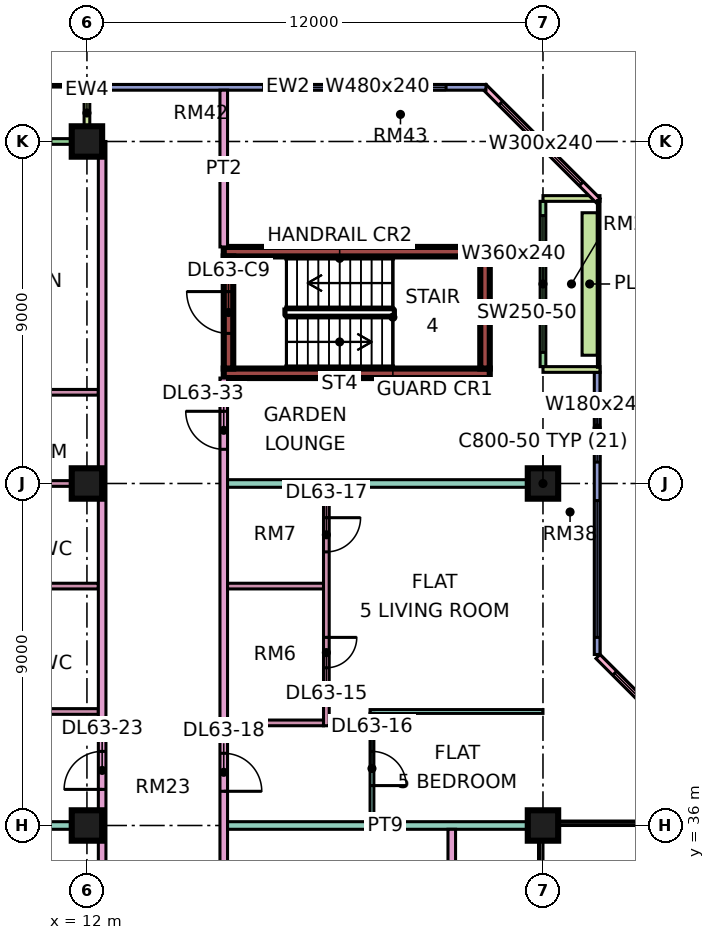
"""IFC4 building model, lengths in metres.
Left out: names, types, materials, properties, quantities, classifications, styles, units other than length and angle.
Written with IfcOpenShell. Run it as: python <this file> out.ifc"""

import sys

from ifc_helpers import new_model, si_unit, direction, frame, frame_2d, origin, origin_2d, place, context, subcontext, project, spatial, rectangle, extrude, element, fill, save


model = new_model("IFC4")
c1 = context("Model", 3, precision=1e-05, world=origin(), true_north=direction((0.0, 1.0)))
c2 = subcontext(c1, "Body", "Model", "MODEL_VIEW")
j1 = project(units=[si_unit("LENGTHUNIT", "METRE"), si_unit("PLANEANGLEUNIT", "RADIAN")], contexts=[c1])
p1 = place(None, origin())
s1 = spatial("IfcSite", under=j1, at=p1, CompositionType="ELEMENT")
p2 = place(p1, origin())
s2 = spatial("IfcBuilding", under=s1, at=p2, CompositionType="ELEMENT")
p3 = place(p2, frame((0.0, 0.0, 273.4)))
s3 = spatial("IfcBuildingStorey", under=s2, at=p3, CompositionType="ELEMENT", Elevation=273.4)
for number, where, z_axis, x_axis in (
    (1, (12.0, 36.0, 0.0), (0.0, 0.0, 1.0), (1.0, 0.0, 0.0)),
    (2, (12.0, 45.0, 0.0), (0.0, 0.0, 1.0), (1.0, 0.0, 0.0)),
    (3, (12.0, 54.0, 0.0), (0.0, 0.0, 1.0), (1.0, 0.0, 0.0)),
    (4, (24.0, 36.0, 0.0), (0.0, 0.0, 1.0), (1.0, 0.0, 0.0)),
    (5, (24.0, 45.0, 0.0), (0.0, 0.0, 1.0), (1.0, 0.0, 0.0)),
):
    element("IfcColumn", number, at=place(p3, frame(where, z_axis=z_axis, x_axis=x_axis)), inside=s3, PredefinedType="COLUMN", context=c2, shape_type="SweptSolid", body=[
        extrude(rectangle(XDim=0.8, YDim=0.8, at=origin_2d()), origin(), (0.0, 0.0, 1.0), 3.75),
    ])
for number, where, z_axis, x_axis in (
    (6, (15.6, 47.9, 0.0), (0.0, 0.0, 1.0), (1.0, 0.0, 0.0)),
    (7, (15.6, 51.1, 0.0), (0.0, 0.0, 1.0), (1.0, 0.0, 0.0)),
):
    element("IfcWall", number, at=place(p3, frame(where, z_axis=z_axis, x_axis=x_axis)), inside=s3, PredefinedType="SHEAR", context=c2, shape_type="SweptSolid", body=[
        extrude(rectangle(XDim=7.0, YDim=0.25, at=frame_2d((3.5, 0.0))), origin(), (0.0, 0.0, 1.0), 3.75),
    ])
p4 = place(p3, frame((15.725, 48.025, 0.0), z_axis=(0.0, 0.0, 1.0), x_axis=(0.0, 1.0, 0.0)))
e8 = element("IfcWall", 8, at=p4, inside=s3, PredefinedType="SHEAR", context=c2, shape_type="SweptSolid", body=[
    extrude(rectangle(XDim=2.95, YDim=0.25, at=frame_2d((1.475, 0.0))), origin(), (0.0, 0.0, 1.0), 3.75),
])
p5 = place(p4, frame((0.925, 0.0, 0.0)))
e9 = element("IfcOpeningElement", 9, at=p5, cuts=e8, PredefinedType="OPENING", context=c2, shape_type="SweptSolid", body=[
    extrude(rectangle(XDim=1.1, YDim=2.2, at=frame_2d((0.55, 1.1))), frame((0.0, 0.135, 0.0), z_axis=(0.0, -1.0, 0.0), x_axis=(1.0, 0.0, 0.0)), (0.0, 0.0, 1.0), 0.27),
])
p6 = place(p3, frame((22.475, 48.025, 0.0), z_axis=(0.0, 0.0, 1.0), x_axis=(0.0, 1.0, 0.0)))
e10 = element("IfcWall", 10, at=p6, inside=s3, PredefinedType="SHEAR", context=c2, shape_type="SweptSolid", body=[
    extrude(rectangle(XDim=2.95, YDim=0.25, at=frame_2d((1.475, 0.0))), origin(), (0.0, 0.0, 1.0), 3.75),
])
p7 = place(p3, frame((28.447, 37.447, 0.0), z_axis=(0.0, 0.0, 1.0), x_axis=(-0.707106781187, 0.707106781187, 0.0)))
e11 = element("IfcWall", 11, at=p7, inside=s3, PredefinedType="SOLIDWALL", context=c2, shape_type="SweptSolid", body=[
    extrude(rectangle(XDim=4.243, YDim=0.15, at=frame_2d((2.121, 0.0))), origin(), (0.0, 0.0, 1.0), 3.35),
])
p8 = place(p7, frame((0.621, 0.0, 0.45)))
e12 = element("IfcOpeningElement", 12, at=p8, cuts=e11, PredefinedType="OPENING", context=c2, shape_type="SweptSolid", body=[
    extrude(rectangle(XDim=3.0, YDim=2.4, at=frame_2d((1.5, 1.2))), frame((0.0, 0.085, 0.0), z_axis=(0.0, -1.0, 0.0), x_axis=(1.0, 0.0, 0.0)), (0.0, 0.0, 1.0), 0.17),
])
p9 = place(p3, frame((25.425, 40.5, 0.0), z_axis=(0.0, 0.0, 1.0), x_axis=(0.0, 1.0, 0.0)))
e13 = element("IfcWall", 13, at=p9, inside=s3, PredefinedType="SOLIDWALL", context=c2, shape_type="SweptSolid", body=[
    extrude(rectangle(XDim=7.425, YDim=0.15, at=frame_2d((3.712, 0.0))), origin(), (0.0, 0.0, 1.0), 3.35),
])
p10 = place(p9, frame((0.45, 0.0, 0.45)))
e14 = element("IfcOpeningElement", 14, at=p10, cuts=e13, PredefinedType="OPENING", context=c2, shape_type="SweptSolid", body=[
    extrude(rectangle(XDim=3.6, YDim=2.4, at=frame_2d((1.8, 1.2))), frame((0.0, 0.085, 0.0), z_axis=(0.0, -1.0, 0.0), x_axis=(1.0, 0.0, 0.0)), (0.0, 0.0, 1.0), 0.17),
])
p11 = place(p9, frame((5.062, 0.0, 0.45)))
e15 = element("IfcOpeningElement", 15, at=p11, cuts=e13, PredefinedType="OPENING", context=c2, shape_type="SweptSolid", body=[
    extrude(rectangle(XDim=1.8, YDim=2.4, at=frame_2d((0.9, 1.2))), frame((0.0, 0.085, 0.0), z_axis=(0.0, -1.0, 0.0), x_axis=(1.0, 0.0, 0.0)), (0.0, 0.0, 1.0), 0.17),
])
p12 = place(p3, frame((24.0, 48.075, 0.0), z_axis=(0.0, 0.0, 1.0), x_axis=(0.0, 1.0, 0.0)))
e16 = element("IfcWall", 16, at=p12, inside=s3, PredefinedType="SOLIDWALL", context=c2, shape_type="SweptSolid", body=[
    extrude(rectangle(XDim=4.35, YDim=0.15, at=frame_2d((2.175, 0.0))), origin(), (0.0, 0.0, 1.0), 3.35),
])
p13 = place(p12, frame((0.375, 0.0, 0.45)))
e17 = element("IfcOpeningElement", 17, at=p13, cuts=e16, PredefinedType="OPENING", context=c2, shape_type="SweptSolid", body=[
    extrude(rectangle(XDim=3.6, YDim=2.4, at=frame_2d((1.8, 1.2))), frame((0.0, 0.085, 0.0), z_axis=(0.0, -1.0, 0.0), x_axis=(1.0, 0.0, 0.0)), (0.0, 0.0, 1.0), 0.17),
])
for number, where, z_axis, x_axis in (
    (18, (25.5, 48.0, 0.0), (0.0, 0.0, 1.0), (-1.0, 0.0, 0.0)),
    (19, (25.5, 52.5, 0.0), (0.0, 0.0, 1.0), (-1.0, 0.0, 0.0)),
):
    element("IfcWall", number, at=place(p3, frame(where, z_axis=z_axis, x_axis=x_axis)), inside=s3, PredefinedType="SOLIDWALL", context=c2, shape_type="SweptSolid", body=[
        extrude(rectangle(XDim=1.5, YDim=0.15, at=frame_2d((0.75, 0.0))), origin(), (0.0, 0.0, 1.0), 3.35),
    ])
p14 = place(p3, frame((25.447, 52.447, 0.0), z_axis=(0.0, 0.0, 1.0), x_axis=(-0.707106781187, 0.707106781187, 0.0)))
e20 = element("IfcWall", 20, at=p14, inside=s3, PredefinedType="SOLIDWALL", context=c2, shape_type="SweptSolid", body=[
    extrude(rectangle(XDim=4.243, YDim=0.15, at=frame_2d((2.121, 0.0))), origin(), (0.0, 0.0, 1.0), 3.35),
])
p15 = place(p14, frame((0.621, 0.0, 0.45)))
e21 = element("IfcOpeningElement", 21, at=p15, cuts=e20, PredefinedType="OPENING", context=c2, shape_type="SweptSolid", body=[
    extrude(rectangle(XDim=3.0, YDim=2.4, at=frame_2d((1.5, 1.2))), frame((0.0, 0.085, 0.0), z_axis=(0.0, -1.0, 0.0), x_axis=(1.0, 0.0, 0.0)), (0.0, 0.0, 1.0), 0.17),
])
p16 = place(p3, frame((22.5, 55.425, 0.0), z_axis=(0.0, 0.0, 1.0), x_axis=(-1.0, 0.0, 0.0)))
e22 = element("IfcWall", 22, at=p16, inside=s3, PredefinedType="SOLIDWALL", context=c2, shape_type="SweptSolid", body=[
    extrude(rectangle(XDim=10.425, YDim=0.15, at=frame_2d((5.212, 0.0))), origin(), (0.0, 0.0, 1.0), 3.35),
])
p17 = place(p16, frame((1.05, 0.0, 0.45)))
e23 = element("IfcOpeningElement", 23, at=p17, cuts=e22, PredefinedType="OPENING", context=c2, shape_type="SweptSolid", body=[
    extrude(rectangle(XDim=4.8, YDim=2.4, at=frame_2d((2.4, 1.2))), frame((0.0, 0.085, 0.0), z_axis=(0.0, -1.0, 0.0), x_axis=(1.0, 0.0, 0.0)), (0.0, 0.0, 1.0), 0.17),
])
p18 = place(p3, frame((11.925, 54.0, 0.0), z_axis=(0.0, 0.0, 1.0), x_axis=(-1.0, 0.0, 0.0)))
e24 = element("IfcWall", 24, at=p18, inside=s3, PredefinedType="SOLIDWALL", context=c2, shape_type="SweptSolid", body=[
    extrude(rectangle(XDim=10.35, YDim=0.15, at=frame_2d((5.175, 0.0))), origin(), (0.0, 0.0, 1.0), 3.35),
])
p19 = place(p18, frame((0.875, 0.0, 0.45)))
e25 = element("IfcOpeningElement", 25, at=p19, cuts=e24, PredefinedType="OPENING", context=c2, shape_type="SweptSolid", body=[
    extrude(rectangle(XDim=3.0, YDim=2.4, at=frame_2d((1.5, 1.2))), frame((0.0, 0.085, 0.0), z_axis=(0.0, -1.0, 0.0), x_axis=(1.0, 0.0, 0.0)), (0.0, 0.0, 1.0), 0.17),
])
p20 = place(p18, frame((7.038, 0.0, 0.0)))
e26 = element("IfcOpeningElement", 26, at=p20, cuts=e24, PredefinedType="OPENING", context=c2, shape_type="SweptSolid", body=[
    extrude(rectangle(XDim=1.8, YDim=2.4, at=frame_2d((0.9, 1.2))), frame((0.0, 0.085, 0.0), z_axis=(0.0, -1.0, 0.0), x_axis=(1.0, 0.0, 0.0)), (0.0, 0.0, 1.0), 0.17),
])
p21 = place(p3, frame((12.0, 55.5, 0.0), z_axis=(0.0, 0.0, 1.0), x_axis=(0.0, -1.0, 0.0)))
e27 = element("IfcWall", 27, at=p21, inside=s3, PredefinedType="SOLIDWALL", context=c2, shape_type="SweptSolid", body=[
    extrude(rectangle(XDim=1.5, YDim=0.15, at=frame_2d((0.75, 0.0))), origin(), (0.0, 0.0, 1.0), 3.35),
])
p22 = place(p3, frame((25.229, 48.375, 0.0), z_axis=(0.0, 0.0, 1.0), x_axis=(0.0, 1.0, 0.0)))
e28 = element("IfcWall", 28, at=p22, inside=s3, PredefinedType="SOLIDWALL", context=c2, shape_type="SweptSolid", body=[
    extrude(rectangle(XDim=3.75, YDim=0.4, at=frame_2d((1.875, 0.0))), origin(), (0.0, 0.0, 1.0), 0.7),
])
p23 = place(p3, frame((0.0, 36.0, 0.0), z_axis=(0.0, 0.0, 1.0), x_axis=(1.0, 0.0, 0.0)))
e29 = element("IfcWall", 29, at=p23, inside=s3, PredefinedType="PARTITIONING", context=c2, shape_type="SweptSolid", body=[
    extrude(rectangle(XDim=12.3, YDim=0.2, at=frame_2d((6.15, 0.0))), origin(), (0.0, 0.0, 1.0), 3.35),
])
for number, where, z_axis, x_axis in (
    (30, (7.675, 39.0, 0.0), (0.0, 0.0, 1.0), (1.0, 0.0, 0.0)),
    (31, (7.675, 42.3, 0.0), (0.0, 0.0, 1.0), (1.0, 0.0, 0.0)),
    (32, (7.675, 45.0, 0.0), (0.0, 0.0, 1.0), (1.0, 0.0, 0.0)),
    (33, (7.675, 47.4, 0.0), (0.0, 0.0, 1.0), (1.0, 0.0, 0.0)),
):
    element("IfcWall", number, at=place(p3, frame(where, z_axis=z_axis, x_axis=x_axis)), inside=s3, PredefinedType="PARTITIONING", context=c2, shape_type="SweptSolid", body=[
        extrude(rectangle(XDim=4.625, YDim=0.15, at=frame_2d((2.312, 0.0))), origin(), (0.0, 0.0, 1.0), 3.35),
    ])
p24 = place(p3, frame((12.4, 20.0, 0.0), z_axis=(0.0, 0.0, 1.0), x_axis=(0.0, 1.0, 0.0)))
e34 = element("IfcWall", 34, at=p24, inside=s3, PredefinedType="PARTITIONING", context=c2, shape_type="SweptSolid", body=[
    extrude(rectangle(XDim=34.0, YDim=0.2, at=frame_2d((17.0, 0.0))), origin(), (0.0, 0.0, 1.0), 3.35),
])
p25 = place(p24, frame((16.95, 0.0, 0.0)))
e35 = element("IfcOpeningElement", 35, at=p25, cuts=e34, PredefinedType="OPENING", context=c2, shape_type="SweptSolid", body=[
    extrude(rectangle(XDim=1.0, YDim=2.1, at=frame_2d((0.5, 1.05))), frame((0.0, 0.11, 0.0), z_axis=(0.0, -1.0, 0.0), x_axis=(1.0, 0.0, 0.0)), (0.0, 0.0, 1.0), 0.22),
])
p26 = place(p24, frame((0.6, 0.0, 0.0)))
e36 = element("IfcOpeningElement", 36, at=p26, cuts=e34, PredefinedType="OPENING", context=c2, shape_type="SweptSolid", body=[
    extrude(rectangle(XDim=1.2, YDim=2.1, at=frame_2d((0.6, 1.05))), frame((0.0, 0.11, 0.0), z_axis=(0.0, -1.0, 0.0), x_axis=(1.0, 0.0, 0.0)), (0.0, 0.0, 1.0), 0.22),
])
p27 = place(p24, frame((13.65, 0.0, 0.0)))
e37 = element("IfcOpeningElement", 37, at=p27, cuts=e34, PredefinedType="OPENING", context=c2, shape_type="SweptSolid", body=[
    extrude(rectangle(XDim=1.0, YDim=2.1, at=frame_2d((0.5, 1.05))), frame((0.0, 0.11, 0.0), z_axis=(0.0, -1.0, 0.0), x_axis=(1.0, 0.0, 0.0)), (0.0, 0.0, 1.0), 0.22),
])
p28 = place(p3, frame((15.6, 20.0, 0.0), z_axis=(0.0, 0.0, 1.0), x_axis=(0.0, 1.0, 0.0)))
e38 = element("IfcWall", 38, at=p28, inside=s3, PredefinedType="PARTITIONING", context=c2, shape_type="SweptSolid", body=[
    extrude(rectangle(XDim=27.775, YDim=0.2, at=frame_2d((13.887, 0.0))), origin(), (0.0, 0.0, 1.0), 3.35),
])
p29 = place(p28, frame((5.95, 0.0, 0.0)))
e39 = element("IfcOpeningElement", 39, at=p29, cuts=e38, PredefinedType="OPENING", context=c2, shape_type="SweptSolid", body=[
    extrude(rectangle(XDim=1.0, YDim=2.1, at=frame_2d((0.5, 1.05))), frame((0.0, 0.11, 0.0), z_axis=(0.0, -1.0, 0.0), x_axis=(1.0, 0.0, 0.0)), (0.0, 0.0, 1.0), 0.22),
])
p30 = place(p28, frame((12.0, 0.0, 0.0)))
e40 = element("IfcOpeningElement", 40, at=p30, cuts=e38, PredefinedType="OPENING", context=c2, shape_type="SweptSolid", body=[
    extrude(rectangle(XDim=1.0, YDim=2.1, at=frame_2d((0.5, 1.05))), frame((0.0, 0.11, 0.0), z_axis=(0.0, -1.0, 0.0), x_axis=(1.0, 0.0, 0.0)), (0.0, 0.0, 1.0), 0.22),
])
p31 = place(p28, frame((16.9, 0.0, 0.0)))
e41 = element("IfcOpeningElement", 41, at=p31, cuts=e38, PredefinedType="OPENING", context=c2, shape_type="SweptSolid", body=[
    extrude(rectangle(XDim=1.0, YDim=2.1, at=frame_2d((0.5, 1.05))), frame((0.0, 0.11, 0.0), z_axis=(0.0, -1.0, 0.0), x_axis=(1.0, 0.0, 0.0)), (0.0, 0.0, 1.0), 0.22),
])
p32 = place(p28, frame((1.15, 0.0, 0.0)))
e42 = element("IfcOpeningElement", 42, at=p32, cuts=e38, PredefinedType="OPENING", context=c2, shape_type="SweptSolid", body=[
    extrude(rectangle(XDim=1.8, YDim=2.1, at=frame_2d((0.9, 1.05))), frame((0.0, 0.11, 0.0), z_axis=(0.0, -1.0, 0.0), x_axis=(1.0, 0.0, 0.0)), (0.0, 0.0, 1.0), 0.22),
])
p33 = place(p28, frame((25.9, 0.0, 0.0)))
e43 = element("IfcOpeningElement", 43, at=p33, cuts=e38, PredefinedType="OPENING", context=c2, shape_type="SweptSolid", body=[
    extrude(rectangle(XDim=1.0, YDim=2.1, at=frame_2d((0.5, 1.05))), frame((0.0, 0.11, 0.0), z_axis=(0.0, -1.0, 0.0), x_axis=(1.0, 0.0, 0.0)), (0.0, 0.0, 1.0), 0.22),
])
p34 = place(p3, frame((15.6, 51.225, 0.0), z_axis=(0.0, 0.0, 1.0), x_axis=(0.0, 1.0, 0.0)))
e44 = element("IfcWall", 44, at=p34, inside=s3, PredefinedType="PARTITIONING", context=c2, shape_type="SweptSolid", body=[
    extrude(rectangle(XDim=4.125, YDim=0.2, at=frame_2d((2.062, 0.0))), origin(), (0.0, 0.0, 1.0), 3.35),
])
p35 = place(p3, frame((15.7, 36.0, 0.0), z_axis=(0.0, 0.0, 1.0), x_axis=(1.0, 0.0, 0.0)))
e45 = element("IfcWall", 45, at=p35, inside=s3, PredefinedType="PARTITIONING", context=c2, shape_type="SweptSolid", body=[
    extrude(rectangle(XDim=8.3, YDim=0.2, at=frame_2d((4.15, 0.0))), origin(), (0.0, 0.0, 1.0), 3.35),
])
for number, where, z_axis, x_axis in (
    (46, (15.7, 38.7, 0.0), (0.0, 0.0, 1.0), (1.0, 0.0, 0.0)),
    (47, (15.7, 42.3, 0.0), (0.0, 0.0, 1.0), (1.0, 0.0, 0.0)),
):
    element("IfcWall", number, at=place(p3, frame(where, z_axis=z_axis, x_axis=x_axis)), inside=s3, PredefinedType="PARTITIONING", context=c2, shape_type="SweptSolid", body=[
        extrude(rectangle(XDim=2.525, YDim=0.15, at=frame_2d((1.263, 0.0))), origin(), (0.0, 0.0, 1.0), 3.35),
    ])
p36 = place(p3, frame((15.7, 45.0, 0.0), z_axis=(0.0, 0.0, 1.0), x_axis=(1.0, 0.0, 0.0)))
e48 = element("IfcWall", 48, at=p36, inside=s3, PredefinedType="PARTITIONING", context=c2, shape_type="SweptSolid", body=[
    extrude(rectangle(XDim=8.3, YDim=0.2, at=frame_2d((4.15, 0.0))), origin(), (0.0, 0.0, 1.0), 3.35),
])
p37 = place(p3, frame((18.3, 38.625, 0.0), z_axis=(0.0, 0.0, 1.0), x_axis=(0.0, 1.0, 0.0)))
e49 = element("IfcWall", 49, at=p37, inside=s3, PredefinedType="PARTITIONING", context=c2, shape_type="SweptSolid", body=[
    extrude(rectangle(XDim=6.275, YDim=0.15, at=frame_2d((3.137, 0.0))), origin(), (0.0, 0.0, 1.0), 3.35),
])
p38 = place(p37, frame((1.525, 0.0, 0.0)))
e50 = element("IfcOpeningElement", 50, at=p38, cuts=e49, PredefinedType="OPENING", context=c2, shape_type="SweptSolid", body=[
    extrude(rectangle(XDim=0.8, YDim=2.1, at=frame_2d((0.4, 1.05))), frame((0.0, 0.085, 0.0), z_axis=(0.0, -1.0, 0.0), x_axis=(1.0, 0.0, 0.0)), (0.0, 0.0, 1.0), 0.17),
])
p39 = place(p37, frame((4.575, 0.0, 0.0)))
e51 = element("IfcOpeningElement", 51, at=p39, cuts=e49, PredefinedType="OPENING", context=c2, shape_type="SweptSolid", body=[
    extrude(rectangle(XDim=0.9, YDim=2.1, at=frame_2d((0.45, 1.05))), frame((0.0, 0.085, 0.0), z_axis=(0.0, -1.0, 0.0), x_axis=(1.0, 0.0, 0.0)), (0.0, 0.0, 1.0), 0.17),
])
p40 = place(p3, frame((19.45, 39.0, 0.0), z_axis=(0.0, 0.0, 1.0), x_axis=(1.0, 0.0, 0.0)))
e52 = element("IfcWall", 52, at=p40, inside=s3, PredefinedType="PARTITIONING", context=c2, shape_type="SweptSolid", body=[
    extrude(rectangle(XDim=4.55, YDim=0.1, at=frame_2d((2.275, 0.0))), origin(), (0.0, 0.0, 1.0), 3.35),
])
p41 = place(p3, frame((19.5, 36.1, 0.0), z_axis=(0.0, 0.0, 1.0), x_axis=(0.0, 1.0, 0.0)))
e53 = element("IfcWall", 53, at=p41, inside=s3, PredefinedType="PARTITIONING", context=c2, shape_type="SweptSolid", body=[
    extrude(rectangle(XDim=2.85, YDim=0.1, at=frame_2d((1.425, 0.0))), origin(), (0.0, 0.0, 1.0), 3.35),
])
p42 = place(p41, frame((0.95, 0.0, 0.0)))
e54 = element("IfcOpeningElement", 54, at=p42, cuts=e53, PredefinedType="OPENING", context=c2, shape_type="SweptSolid", body=[
    extrude(rectangle(XDim=0.9, YDim=2.1, at=frame_2d((0.45, 1.05))), frame((0.0, 0.06, 0.0), z_axis=(0.0, -1.0, 0.0), x_axis=(1.0, 0.0, 0.0)), (0.0, 0.0, 1.0), 0.12),
])
p43 = place(p3, frame((21.6, 23.9, 0.0), z_axis=(0.0, 0.0, 1.0), x_axis=(0.0, 1.0, 0.0)))
e55 = element("IfcWall", 55, at=p43, inside=s3, PredefinedType="PARTITIONING", context=c2, shape_type="SweptSolid", body=[
    extrude(rectangle(XDim=12.0, YDim=0.2, at=frame_2d((6.0, 0.0))), origin(), (0.0, 0.0, 1.0), 3.35),
])
p44 = place(p8, origin())
e56 = element("IfcWindow", 56, at=p44, inside=s3, PartitioningType="SINGLE_PANEL", PredefinedType="WINDOW", context=c2, shape_type="SweptSolid", body=[
    extrude(rectangle(XDim=3.0, YDim=2.4, at=frame_2d((1.5, 1.2))), frame((0.0, 0.03, 0.0), z_axis=(0.0, -1.0, 0.0), x_axis=(1.0, 0.0, 0.0)), (0.0, 0.0, 1.0), 0.06),
])
fill(e12, e56)
p45 = place(p10, origin())
e57 = element("IfcWindow", 57, at=p45, inside=s3, PartitioningType="SINGLE_PANEL", PredefinedType="WINDOW", context=c2, shape_type="SweptSolid", body=[
    extrude(rectangle(XDim=3.6, YDim=2.4, at=frame_2d((1.8, 1.2))), frame((0.0, 0.03, 0.0), z_axis=(0.0, -1.0, 0.0), x_axis=(1.0, 0.0, 0.0)), (0.0, 0.0, 1.0), 0.06),
])
fill(e14, e57)
p46 = place(p11, origin())
e58 = element("IfcWindow", 58, at=p46, inside=s3, PartitioningType="SINGLE_PANEL", PredefinedType="WINDOW", context=c2, shape_type="SweptSolid", body=[
    extrude(rectangle(XDim=1.8, YDim=2.4, at=frame_2d((0.9, 1.2))), frame((0.0, 0.03, 0.0), z_axis=(0.0, -1.0, 0.0), x_axis=(1.0, 0.0, 0.0)), (0.0, 0.0, 1.0), 0.06),
])
fill(e15, e58)
p47 = place(p13, origin())
e59 = element("IfcWindow", 59, at=p47, inside=s3, PartitioningType="SINGLE_PANEL", PredefinedType="WINDOW", context=c2, shape_type="SweptSolid", body=[
    extrude(rectangle(XDim=3.6, YDim=2.4, at=frame_2d((1.8, 1.2))), frame((0.0, 0.03, 0.0), z_axis=(0.0, -1.0, 0.0), x_axis=(1.0, 0.0, 0.0)), (0.0, 0.0, 1.0), 0.06),
])
fill(e17, e59)
p48 = place(p15, origin())
e60 = element("IfcWindow", 60, at=p48, inside=s3, PartitioningType="SINGLE_PANEL", PredefinedType="WINDOW", context=c2, shape_type="SweptSolid", body=[
    extrude(rectangle(XDim=3.0, YDim=2.4, at=frame_2d((1.5, 1.2))), frame((0.0, 0.03, 0.0), z_axis=(0.0, -1.0, 0.0), x_axis=(1.0, 0.0, 0.0)), (0.0, 0.0, 1.0), 0.06),
])
fill(e21, e60)
p49 = place(p17, origin())
e61 = element("IfcWindow", 61, at=p49, inside=s3, PartitioningType="SINGLE_PANEL", PredefinedType="WINDOW", context=c2, shape_type="SweptSolid", body=[
    extrude(rectangle(XDim=4.8, YDim=2.4, at=frame_2d((2.4, 1.2))), frame((0.0, 0.03, 0.0), z_axis=(0.0, -1.0, 0.0), x_axis=(1.0, 0.0, 0.0)), (0.0, 0.0, 1.0), 0.06),
])
fill(e23, e61)
p50 = place(p5, frame((1.1, 0.0, 0.0), z_axis=(0.0, 0.0, 1.0), x_axis=(-1.0, 0.0, 0.0)))
e62 = element("IfcDoor", 62, at=p50, inside=s3, OperationType="SINGLE_SWING_RIGHT", PredefinedType="DOOR", context=c2, shape_type="SweptSolid", body=[
    extrude(rectangle(XDim=1.1, YDim=2.2, at=frame_2d((0.55, 1.1))), frame((0.0, 0.025, 0.0), z_axis=(0.0, -1.0, 0.0), x_axis=(1.0, 0.0, 0.0)), (0.0, 0.0, 1.0), 0.05),
])
fill(e9, e62)
p51 = place(p38, origin())
e63 = element("IfcDoor", 63, at=p51, inside=s3, OperationType="SINGLE_SWING_RIGHT", PredefinedType="DOOR", context=c2, shape_type="SweptSolid", body=[
    extrude(rectangle(XDim=0.8, YDim=2.1, at=frame_2d((0.4, 1.05))), frame((0.0, 0.025, 0.0), z_axis=(0.0, -1.0, 0.0), x_axis=(1.0, 0.0, 0.0)), (0.0, 0.0, 1.0), 0.05),
])
fill(e50, e63)
p52 = place(p42, frame((0.9, 0.0, 0.0), z_axis=(0.0, 0.0, 1.0), x_axis=(-1.0, 0.0, 0.0)))
e64 = element("IfcDoor", 64, at=p52, inside=s3, OperationType="SINGLE_SWING_LEFT", PredefinedType="DOOR", context=c2, shape_type="SweptSolid", body=[
    extrude(rectangle(XDim=0.9, YDim=2.1, at=frame_2d((0.45, 1.05))), frame((0.0, 0.025, 0.0), z_axis=(0.0, -1.0, 0.0), x_axis=(1.0, 0.0, 0.0)), (0.0, 0.0, 1.0), 0.05),
])
fill(e54, e64)
p53 = place(p39, origin())
e65 = element("IfcDoor", 65, at=p53, inside=s3, OperationType="SINGLE_SWING_RIGHT", PredefinedType="DOOR", context=c2, shape_type="SweptSolid", body=[
    extrude(rectangle(XDim=0.9, YDim=2.1, at=frame_2d((0.45, 1.05))), frame((0.0, 0.025, 0.0), z_axis=(0.0, -1.0, 0.0), x_axis=(1.0, 0.0, 0.0)), (0.0, 0.0, 1.0), 0.05),
])
fill(e51, e65)
p54 = place(p31, frame((1.0, 0.0, 0.0), z_axis=(0.0, 0.0, 1.0), x_axis=(-1.0, 0.0, 0.0)))
e66 = element("IfcDoor", 66, at=p54, inside=s3, OperationType="SINGLE_SWING_LEFT", PredefinedType="DOOR", context=c2, shape_type="SweptSolid", body=[
    extrude(rectangle(XDim=1.0, YDim=2.1, at=frame_2d((0.5, 1.05))), frame((0.0, 0.025, 0.0), z_axis=(0.0, -1.0, 0.0), x_axis=(1.0, 0.0, 0.0)), (0.0, 0.0, 1.0), 0.05),
])
fill(e41, e66)
p55 = place(p25, origin())
e67 = element("IfcDoor", 67, at=p55, inside=s3, OperationType="SINGLE_SWING_LEFT", PredefinedType="DOOR", context=c2, shape_type="SweptSolid", body=[
    extrude(rectangle(XDim=1.0, YDim=2.1, at=frame_2d((0.5, 1.05))), frame((0.0, 0.025, 0.0), z_axis=(0.0, -1.0, 0.0), x_axis=(1.0, 0.0, 0.0)), (0.0, 0.0, 1.0), 0.05),
])
fill(e35, e67)
p56 = place(p33, frame((1.0, 0.0, 0.0), z_axis=(0.0, 0.0, 1.0), x_axis=(-1.0, 0.0, 0.0)))
e68 = element("IfcDoor", 68, at=p56, inside=s3, OperationType="SINGLE_SWING_RIGHT", PredefinedType="DOOR", context=c2, shape_type="SweptSolid", body=[
    extrude(rectangle(XDim=1.0, YDim=2.1, at=frame_2d((0.5, 1.05))), frame((0.0, 0.025, 0.0), z_axis=(0.0, -1.0, 0.0), x_axis=(1.0, 0.0, 0.0)), (0.0, 0.0, 1.0), 0.05),
])
fill(e43, e68)
save(model, sys.argv[1])
